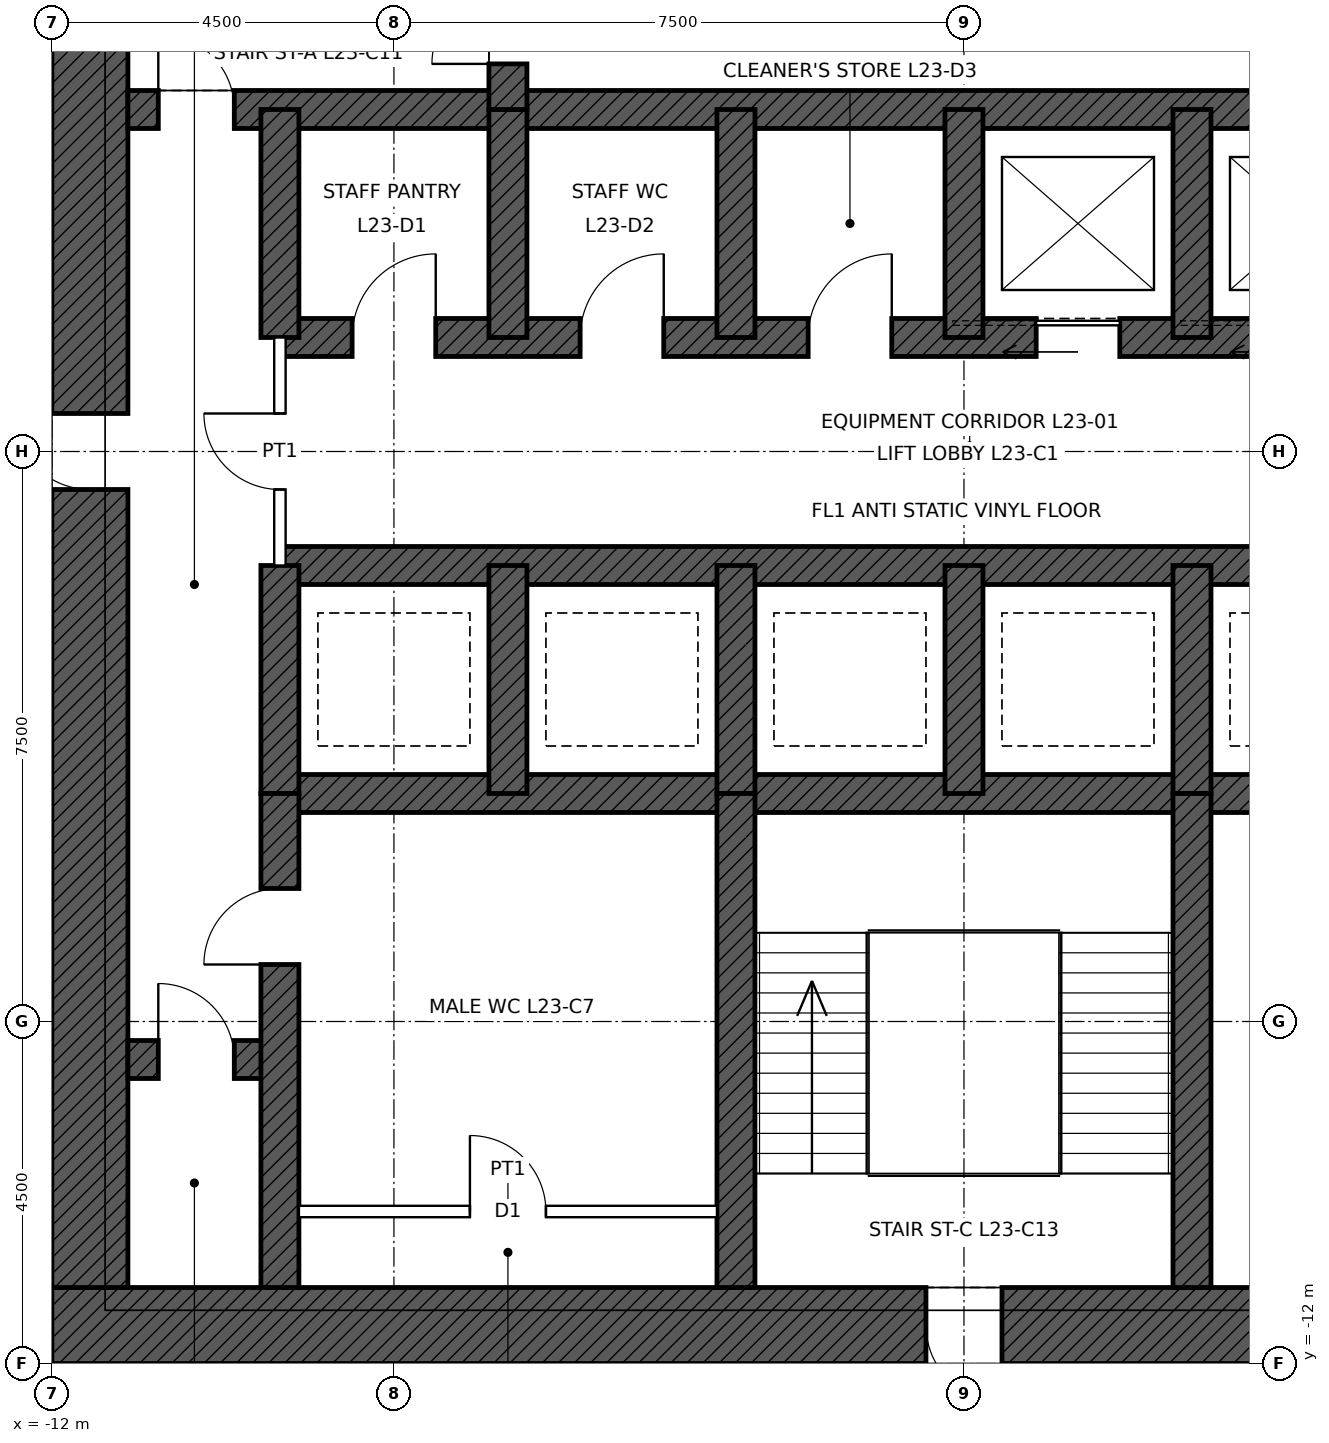
"""IFC4 building model, lengths in metres.
Left out: names, types, materials, properties, quantities, classifications, styles, units other than length and angle.
Written with IfcOpenShell. Run it as: python <this file> out.ifc"""

import sys

from ifc_helpers import new_model, si_unit, direction, frame, frame_2d, origin, place, context, subcontext, project, spatial, rectangle, extrude, element, fill, save


model = new_model("IFC4")
c1 = context("Model", 3, precision=1e-05, world=origin(), true_north=direction((0.0, 1.0)))
c2 = subcontext(c1, "Body", "Model", "MODEL_VIEW")
j1 = project(units=[si_unit("LENGTHUNIT", "METRE"), si_unit("PLANEANGLEUNIT", "RADIAN")], contexts=[c1])
p1 = place(None, origin())
s1 = spatial("IfcSite", under=j1, at=p1, CompositionType="ELEMENT")
p2 = place(p1, origin())
s2 = spatial("IfcBuilding", under=s1, at=p2, CompositionType="ELEMENT")
p3 = place(p2, frame((0.0, 0.0, 117.9)))
s3 = spatial("IfcBuildingStorey", under=s2, at=p3, CompositionType="ELEMENT", Elevation=117.9)
p4 = place(p3, frame((12.0, -11.5, 0.0), z_axis=(0.0, 0.0, 1.0), x_axis=(-1.0, 0.0, 0.0)))
e1 = element("IfcWall", 1, at=p4, inside=s3, PredefinedType="SHEAR", context=c2, shape_type="SweptSolid", body=[
    extrude(rectangle(XDim=24.0, YDim=1.0, at=frame_2d((12.0, 0.0))), origin(), (0.0, 0.0, 1.0), 4.5),
])
p5 = place(p4, frame((11.5, 0.0, 0.0)))
e2 = element("IfcOpeningElement", 2, at=p5, cuts=e1, PredefinedType="OPENING", context=c2, shape_type="SweptSolid", body=[
    extrude(rectangle(XDim=1.0, YDim=2.1, at=frame_2d((0.5, 1.05))), frame((0.0, 0.51, 0.0), z_axis=(0.0, -1.0, 0.0), x_axis=(1.0, 0.0, 0.0)), (0.0, 0.0, 1.0), 1.02),
])
p6 = place(p4, frame((1.0, 0.0, 0.0)))
e3 = element("IfcOpeningElement", 3, at=p6, cuts=e1, PredefinedType="OPENING", context=c2, shape_type="SweptSolid", body=[
    extrude(rectangle(XDim=1.0, YDim=2.4, at=frame_2d((0.5, 1.2))), frame((0.0, 0.51, 0.0), z_axis=(0.0, -1.0, 0.0), x_axis=(1.0, 0.0, 0.0)), (0.0, 0.0, 1.0), 1.02),
])
p7 = place(p3, frame((-11.5, -11.0, 0.0), z_axis=(0.0, 0.0, 1.0), x_axis=(0.0, 1.0, 0.0)))
e4 = element("IfcWall", 4, at=p7, inside=s3, PredefinedType="SHEAR", context=c2, shape_type="SweptSolid", body=[
    extrude(rectangle(XDim=22.0, YDim=1.0, at=frame_2d((11.0, 0.0))), origin(), (0.0, 0.0, 1.0), 4.5),
])
p8 = place(p7, frame((10.5, 0.0, 0.0)))
e5 = element("IfcOpeningElement", 5, at=p8, cuts=e4, PredefinedType="OPENING", context=c2, shape_type="SweptSolid", body=[
    extrude(rectangle(XDim=1.0, YDim=2.4, at=frame_2d((0.5, 1.2))), frame((0.0, 0.51, 0.0), z_axis=(0.0, -1.0, 0.0), x_axis=(1.0, 0.0, 0.0)), (0.0, 0.0, 1.0), 1.02),
])
p9 = place(p3, frame((-11.0, 4.5, 0.0), z_axis=(0.0, 0.0, 1.0), x_axis=(1.0, 0.0, 0.0)))
e6 = element("IfcWall", 6, at=p9, inside=s3, PredefinedType="SHEAR", context=c2, shape_type="SweptSolid", body=[
    extrude(rectangle(XDim=22.0, YDim=0.5, at=frame_2d((11.0, 0.0))), origin(), (0.0, 0.0, 1.0), 4.5),
])
p10 = place(p9, frame((0.4, 0.0, 0.0)))
e7 = element("IfcOpeningElement", 7, at=p10, cuts=e6, PredefinedType="OPENING", context=c2, shape_type="SweptSolid", body=[
    extrude(rectangle(XDim=1.0, YDim=2.1, at=frame_2d((0.5, 1.05))), frame((0.0, 0.26, 0.0), z_axis=(0.0, -1.0, 0.0), x_axis=(1.0, 0.0, 0.0)), (0.0, 0.0, 1.0), 0.52),
])
p11 = place(p9, frame((20.6, 0.0, 0.0)))
e8 = element("IfcOpeningElement", 8, at=p11, cuts=e6, PredefinedType="OPENING", context=c2, shape_type="SweptSolid", body=[
    extrude(rectangle(XDim=1.0, YDim=2.1, at=frame_2d((0.5, 1.05))), frame((0.0, 0.26, 0.0), z_axis=(0.0, -1.0, 0.0), x_axis=(1.0, 0.0, 0.0)), (0.0, 0.0, 1.0), 0.52),
])
p12 = place(p3, frame((-9.0, 1.5, 0.0), z_axis=(0.0, 0.0, 1.0), x_axis=(1.0, 0.0, 0.0)))
e9 = element("IfcWall", 9, at=p12, inside=s3, PredefinedType="SHEAR", context=c2, shape_type="SweptSolid", body=[
    extrude(rectangle(XDim=18.0, YDim=0.5, at=frame_2d((9.0, 0.0))), origin(), (0.0, 0.0, 1.0), 4.5),
])
p13 = place(p12, frame((9.95, 0.0, 0.0)))
e10 = element("IfcOpeningElement", 10, at=p13, cuts=e9, PredefinedType="OPENING", context=c2, shape_type="SweptSolid", body=[
    extrude(rectangle(XDim=1.1, YDim=2.1, at=frame_2d((0.55, 1.05))), frame((0.0, 0.26, 0.0), z_axis=(0.0, -1.0, 0.0), x_axis=(1.0, 0.0, 0.0)), (0.0, 0.0, 1.0), 0.52),
])
p14 = place(p12, frame((12.95, 0.0, 0.0)))
e11 = element("IfcOpeningElement", 11, at=p14, cuts=e9, PredefinedType="OPENING", context=c2, shape_type="SweptSolid", body=[
    extrude(rectangle(XDim=1.1, YDim=2.1, at=frame_2d((0.55, 1.05))), frame((0.0, 0.26, 0.0), z_axis=(0.0, -1.0, 0.0), x_axis=(1.0, 0.0, 0.0)), (0.0, 0.0, 1.0), 0.52),
])
p15 = place(p12, frame((15.95, 0.0, 0.0)))
e12 = element("IfcOpeningElement", 12, at=p15, cuts=e9, PredefinedType="OPENING", context=c2, shape_type="SweptSolid", body=[
    extrude(rectangle(XDim=1.1, YDim=2.1, at=frame_2d((0.55, 1.05))), frame((0.0, 0.26, 0.0), z_axis=(0.0, -1.0, 0.0), x_axis=(1.0, 0.0, 0.0)), (0.0, 0.0, 1.0), 0.52),
])
p16 = place(p12, frame((0.95, 0.0, 0.0)))
e13 = element("IfcOpeningElement", 13, at=p16, cuts=e9, PredefinedType="OPENING", context=c2, shape_type="SweptSolid", body=[
    extrude(rectangle(XDim=1.1, YDim=2.1, at=frame_2d((0.55, 1.05))), frame((0.0, 0.26, 0.0), z_axis=(0.0, -1.0, 0.0), x_axis=(1.0, 0.0, 0.0)), (0.0, 0.0, 1.0), 0.52),
])
p17 = place(p12, frame((3.95, 0.0, 0.0)))
e14 = element("IfcOpeningElement", 14, at=p17, cuts=e9, PredefinedType="OPENING", context=c2, shape_type="SweptSolid", body=[
    extrude(rectangle(XDim=1.1, YDim=2.1, at=frame_2d((0.55, 1.05))), frame((0.0, 0.26, 0.0), z_axis=(0.0, -1.0, 0.0), x_axis=(1.0, 0.0, 0.0)), (0.0, 0.0, 1.0), 0.52),
])
p18 = place(p12, frame((6.95, 0.0, 0.0)))
e15 = element("IfcOpeningElement", 15, at=p18, cuts=e9, PredefinedType="OPENING", context=c2, shape_type="SweptSolid", body=[
    extrude(rectangle(XDim=1.1, YDim=2.1, at=frame_2d((0.55, 1.05))), frame((0.0, 0.26, 0.0), z_axis=(0.0, -1.0, 0.0), x_axis=(1.0, 0.0, 0.0)), (0.0, 0.0, 1.0), 0.52),
])
for number, where, z_axis, x_axis in (
    (16, (-9.0, -1.5, 0.0), (0.0, 0.0, 1.0), (1.0, 0.0, 0.0)),
    (17, (-9.0, -4.5, 0.0), (0.0, 0.0, 1.0), (1.0, 0.0, 0.0)),
):
    element("IfcWall", number, at=place(p3, frame(where, z_axis=z_axis, x_axis=x_axis)), inside=s3, PredefinedType="SHEAR", context=c2, shape_type="SweptSolid", body=[
        extrude(rectangle(XDim=18.0, YDim=0.5, at=frame_2d((9.0, 0.0))), origin(), (0.0, 0.0, 1.0), 4.5),
    ])
p19 = place(p3, frame((-11.0, -8.0, 0.0), z_axis=(0.0, 0.0, 1.0), x_axis=(1.0, 0.0, 0.0)))
e18 = element("IfcWall", 18, at=p19, inside=s3, PredefinedType="SHEAR", context=c2, shape_type="SweptSolid", body=[
    extrude(rectangle(XDim=2.0, YDim=0.5, at=frame_2d((1.0, 0.0))), origin(), (0.0, 0.0, 1.0), 4.5),
])
p20 = place(p19, frame((0.4, 0.0, 0.0)))
e19 = element("IfcOpeningElement", 19, at=p20, cuts=e18, PredefinedType="OPENING", context=c2, shape_type="SweptSolid", body=[
    extrude(rectangle(XDim=1.0, YDim=2.1, at=frame_2d((0.5, 1.05))), frame((0.0, 0.26, 0.0), z_axis=(0.0, -1.0, 0.0), x_axis=(1.0, 0.0, 0.0)), (0.0, 0.0, 1.0), 0.52),
])
for number, where, z_axis, x_axis in (
    (20, (-9.0, 1.5, 0.0), (0.0, 0.0, 1.0), (0.0, 1.0, 0.0)),
    (21, (-9.0, -4.5, 0.0), (0.0, 0.0, 1.0), (0.0, 1.0, 0.0)),
    (22, (-6.0, 1.5, 0.0), (0.0, 0.0, 1.0), (0.0, 1.0, 0.0)),
    (23, (-3.0, 1.5, 0.0), (0.0, 0.0, 1.0), (0.0, 1.0, 0.0)),
    (24, (0.0, 1.5, 0.0), (0.0, 0.0, 1.0), (0.0, 1.0, 0.0)),
    (25, (3.0, 1.5, 0.0), (0.0, 0.0, 1.0), (0.0, 1.0, 0.0)),
    (26, (-6.0, -4.5, 0.0), (0.0, 0.0, 1.0), (0.0, 1.0, 0.0)),
    (27, (-3.0, -4.5, 0.0), (0.0, 0.0, 1.0), (0.0, 1.0, 0.0)),
    (28, (0.0, -4.5, 0.0), (0.0, 0.0, 1.0), (0.0, 1.0, 0.0)),
    (29, (3.0, -4.5, 0.0), (0.0, 0.0, 1.0), (0.0, 1.0, 0.0)),
):
    element("IfcWall", number, at=place(p3, frame(where, z_axis=z_axis, x_axis=x_axis)), inside=s3, PredefinedType="SHEAR", context=c2, shape_type="SweptSolid", body=[
        extrude(rectangle(XDim=3.0, YDim=0.5, at=frame_2d((1.5, 0.0))), origin(), (0.0, 0.0, 1.0), 4.5),
    ])
p21 = place(p3, frame((-6.0, 4.5, 0.0), z_axis=(0.0, 0.0, 1.0), x_axis=(0.0, 1.0, 0.0)))
e30 = element("IfcWall", 30, at=p21, inside=s3, PredefinedType="SHEAR", context=c2, shape_type="SweptSolid", body=[
    extrude(rectangle(XDim=6.5, YDim=0.5, at=frame_2d((3.25, 0.0))), origin(), (0.0, 0.0, 1.0), 4.5),
])
p22 = place(p21, frame((0.6, 0.0, 0.0)))
e31 = element("IfcOpeningElement", 31, at=p22, cuts=e30, PredefinedType="OPENING", context=c2, shape_type="SweptSolid", body=[
    extrude(rectangle(XDim=1.0, YDim=2.1, at=frame_2d((0.5, 1.05))), frame((0.0, 0.26, 0.0), z_axis=(0.0, -1.0, 0.0), x_axis=(1.0, 0.0, 0.0)), (0.0, 0.0, 1.0), 0.52),
])
p23 = place(p3, frame((-9.0, -11.0, 0.0), z_axis=(0.0, 0.0, 1.0), x_axis=(0.0, 1.0, 0.0)))
e32 = element("IfcWall", 32, at=p23, inside=s3, PredefinedType="SHEAR", context=c2, shape_type="SweptSolid", body=[
    extrude(rectangle(XDim=6.5, YDim=0.5, at=frame_2d((3.25, 0.0))), origin(), (0.0, 0.0, 1.0), 4.5),
])
p24 = place(p23, frame((4.25, 0.0, 0.0)))
e33 = element("IfcOpeningElement", 33, at=p24, cuts=e32, PredefinedType="OPENING", context=c2, shape_type="SweptSolid", body=[
    extrude(rectangle(XDim=1.0, YDim=2.1, at=frame_2d((0.5, 1.05))), frame((0.0, 0.26, 0.0), z_axis=(0.0, -1.0, 0.0), x_axis=(1.0, 0.0, 0.0)), (0.0, 0.0, 1.0), 0.52),
])
for number, where, z_axis, x_axis in (
    (34, (-3.0, -11.0, 0.0), (0.0, 0.0, 1.0), (0.0, 1.0, 0.0)),
    (35, (3.0, -11.0, 0.0), (0.0, 0.0, 1.0), (0.0, 1.0, 0.0)),
):
    element("IfcWall", number, at=place(p3, frame(where, z_axis=z_axis, x_axis=x_axis)), inside=s3, PredefinedType="SHEAR", context=c2, shape_type="SweptSolid", body=[
        extrude(rectangle(XDim=6.5, YDim=0.5, at=frame_2d((3.25, 0.0))), origin(), (0.0, 0.0, 1.0), 4.5),
    ])
p25 = place(p3, frame((-8.75, -10.0, 0.0), z_axis=(0.0, 0.0, 1.0), x_axis=(1.0, 0.0, 0.0)))
e36 = element("IfcWall", 36, at=p25, inside=s3, PredefinedType="PARTITIONING", context=c2, shape_type="SweptSolid", body=[
    extrude(rectangle(XDim=5.5, YDim=0.15, at=frame_2d((2.75, 0.0))), origin(), (0.0, 0.0, 1.0), 4.25),
])
p26 = place(p25, frame((2.25, 0.0, 0.0)))
e37 = element("IfcOpeningElement", 37, at=p26, cuts=e36, PredefinedType="OPENING", context=c2, shape_type="SweptSolid", body=[
    extrude(rectangle(XDim=1.0, YDim=2.1, at=frame_2d((0.5, 1.05))), frame((0.0, 0.085, 0.0), z_axis=(0.0, -1.0, 0.0), x_axis=(1.0, 0.0, 0.0)), (0.0, 0.0, 1.0), 0.17),
])
p27 = place(p3, frame((-9.0, -1.5, 0.0), z_axis=(0.0, 0.0, 1.0), x_axis=(0.0, 1.0, 0.0)))
e38 = element("IfcWall", 38, at=p27, inside=s3, PredefinedType="PARTITIONING", context=c2, shape_type="SweptSolid", body=[
    extrude(rectangle(XDim=3.0, YDim=0.15, at=frame_2d((1.5, 0.0))), origin(), (0.0, 0.0, 1.0), 4.25),
])
p28 = place(p27, frame((1.0, 0.0, 0.0)))
e39 = element("IfcOpeningElement", 39, at=p28, cuts=e38, PredefinedType="OPENING", context=c2, shape_type="SweptSolid", body=[
    extrude(rectangle(XDim=1.0, YDim=2.4, at=frame_2d((0.5, 1.2))), frame((0.0, 0.085, 0.0), z_axis=(0.0, -1.0, 0.0), x_axis=(1.0, 0.0, 0.0)), (0.0, 0.0, 1.0), 0.17),
])
p29 = place(p10, origin())
e40 = element("IfcDoor", 40, at=p29, inside=s3, OperationType="SINGLE_SWING_LEFT", PredefinedType="DOOR", context=c2, shape_type="SweptSolid", body=[
    extrude(rectangle(XDim=1.0, YDim=2.1, at=frame_2d((0.5, 1.05))), frame((0.0, 0.025, 0.0), z_axis=(0.0, -1.0, 0.0), x_axis=(1.0, 0.0, 0.0)), (0.0, 0.0, 1.0), 0.05),
])
fill(e7, e40)
p30 = place(p22, origin())
e41 = element("IfcDoor", 41, at=p30, inside=s3, OperationType="SINGLE_SWING_LEFT", PredefinedType="DOOR", context=c2, shape_type="SweptSolid", body=[
    extrude(rectangle(XDim=1.0, YDim=2.1, at=frame_2d((0.5, 1.05))), frame((0.0, 0.025, 0.0), z_axis=(0.0, -1.0, 0.0), x_axis=(1.0, 0.0, 0.0)), (0.0, 0.0, 1.0), 0.05),
])
fill(e31, e41)
p31 = place(p5, origin())
e42 = element("IfcDoor", 42, at=p31, inside=s3, OperationType="SINGLE_SWING_LEFT", PredefinedType="DOOR", context=c2, shape_type="SweptSolid", body=[
    extrude(rectangle(XDim=1.0, YDim=2.1, at=frame_2d((0.5, 1.05))), frame((0.0, 0.485, 0.0), z_axis=(0.0, -1.0, 0.0), x_axis=(1.0, 0.0, 0.0)), (0.0, 0.0, 1.0), 0.05),
])
fill(e2, e42)
p32 = place(p8, origin())
e43 = element("IfcDoor", 43, at=p32, inside=s3, OperationType="SINGLE_SWING_RIGHT", PredefinedType="DOOR", context=c2, shape_type="SweptSolid", body=[
    extrude(rectangle(XDim=1.0, YDim=2.4, at=frame_2d((0.5, 1.2))), frame((0.0, 0.485, 0.0), z_axis=(0.0, -1.0, 0.0), x_axis=(1.0, 0.0, 0.0)), (0.0, 0.0, 1.0), 0.05),
])
fill(e5, e43)
p33 = place(p24, origin())
e44 = element("IfcDoor", 44, at=p33, inside=s3, OperationType="SINGLE_SWING_LEFT", PredefinedType="DOOR", context=c2, shape_type="SweptSolid", body=[
    extrude(rectangle(XDim=1.0, YDim=2.1, at=frame_2d((0.5, 1.05))), frame((0.0, 0.025, 0.0), z_axis=(0.0, -1.0, 0.0), x_axis=(1.0, 0.0, 0.0)), (0.0, 0.0, 1.0), 0.05),
])
fill(e33, e44)
p34 = place(p20, origin())
e45 = element("IfcDoor", 45, at=p34, inside=s3, OperationType="SINGLE_SWING_LEFT", PredefinedType="DOOR", context=c2, shape_type="SweptSolid", body=[
    extrude(rectangle(XDim=1.0, YDim=2.1, at=frame_2d((0.5, 1.05))), frame((0.0, 0.025, 0.0), z_axis=(0.0, -1.0, 0.0), x_axis=(1.0, 0.0, 0.0)), (0.0, 0.0, 1.0), 0.05),
])
fill(e19, e45)
p35 = place(p13, origin())
e46 = element("IfcDoor", 46, at=p35, inside=s3, OperationType="SLIDING_TO_LEFT", PredefinedType="DOOR", context=c2, shape_type="SweptSolid", body=[
    extrude(rectangle(XDim=1.1, YDim=2.1, at=frame_2d((0.55, 1.05))), frame((0.0, 0.025, 0.0), z_axis=(0.0, -1.0, 0.0), x_axis=(1.0, 0.0, 0.0)), (0.0, 0.0, 1.0), 0.05),
])
fill(e10, e46)
p36 = place(p26, origin())
e47 = element("IfcDoor", 47, at=p36, inside=s3, OperationType="SINGLE_SWING_LEFT", PredefinedType="DOOR", context=c2, shape_type="SweptSolid", body=[
    extrude(rectangle(XDim=1.0, YDim=2.1, at=frame_2d((0.5, 1.05))), frame((0.0, 0.025, 0.0), z_axis=(0.0, -1.0, 0.0), x_axis=(1.0, 0.0, 0.0)), (0.0, 0.0, 1.0), 0.05),
])
fill(e37, e47)
p37 = place(p28, origin())
e48 = element("IfcDoor", 48, at=p37, inside=s3, OperationType="SINGLE_SWING_RIGHT", PredefinedType="DOOR", context=c2, shape_type="SweptSolid", body=[
    extrude(rectangle(XDim=1.0, YDim=2.4, at=frame_2d((0.5, 1.2))), frame((0.0, 0.025, 0.0), z_axis=(0.0, -1.0, 0.0), x_axis=(1.0, 0.0, 0.0)), (0.0, 0.0, 1.0), 0.05),
])
fill(e39, e48)
p38 = place(p16, origin())
e49 = element("IfcDoor", 49, at=p38, inside=s3, OperationType="SINGLE_SWING_RIGHT", PredefinedType="DOOR", context=c2, shape_type="SweptSolid", body=[
    extrude(rectangle(XDim=1.1, YDim=2.1, at=frame_2d((0.55, 1.05))), frame((0.0, 0.025, 0.0), z_axis=(0.0, -1.0, 0.0), x_axis=(1.0, 0.0, 0.0)), (0.0, 0.0, 1.0), 0.05),
])
fill(e13, e49)
p39 = place(p17, origin())
e50 = element("IfcDoor", 50, at=p39, inside=s3, OperationType="SINGLE_SWING_RIGHT", PredefinedType="DOOR", context=c2, shape_type="SweptSolid", body=[
    extrude(rectangle(XDim=1.1, YDim=2.1, at=frame_2d((0.55, 1.05))), frame((0.0, 0.025, 0.0), z_axis=(0.0, -1.0, 0.0), x_axis=(1.0, 0.0, 0.0)), (0.0, 0.0, 1.0), 0.05),
])
fill(e14, e50)
p40 = place(p18, origin())
e51 = element("IfcDoor", 51, at=p40, inside=s3, OperationType="SINGLE_SWING_RIGHT", PredefinedType="DOOR", context=c2, shape_type="SweptSolid", body=[
    extrude(rectangle(XDim=1.1, YDim=2.1, at=frame_2d((0.55, 1.05))), frame((0.0, 0.025, 0.0), z_axis=(0.0, -1.0, 0.0), x_axis=(1.0, 0.0, 0.0)), (0.0, 0.0, 1.0), 0.05),
])
fill(e15, e51)
save(model, sys.argv[1])
